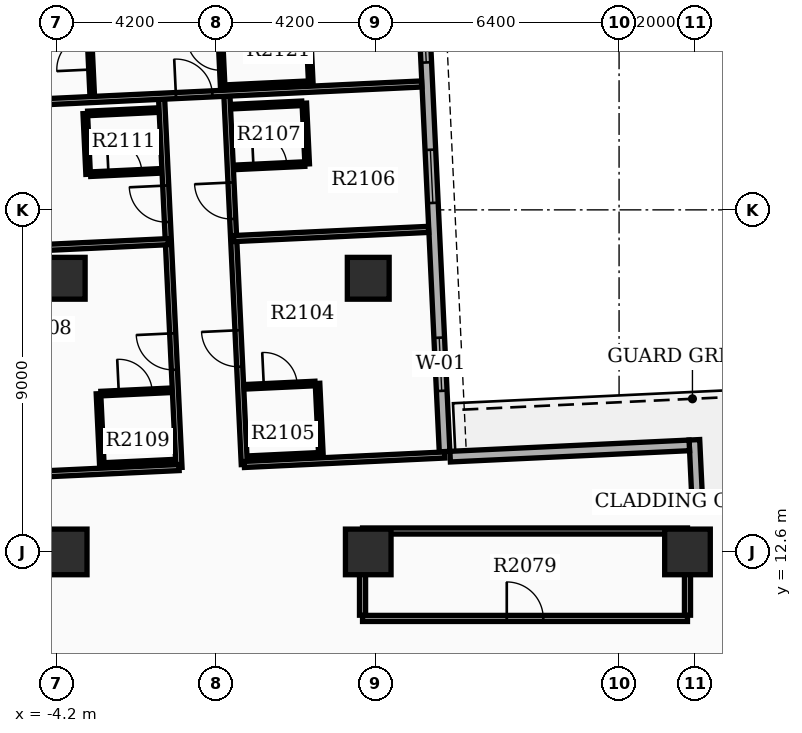
"""IFC4 building model, lengths in metres.
Left out: names, types, materials, properties, quantities, classifications, styles, units other than length and angle.
Written with IfcOpenShell. Run it as: python <this file> out.ifc"""

import sys

from ifc_helpers import new_model, si_unit, direction, frame, frame_2d, origin, origin_2d, place, context, subcontext, project, spatial, rectangle, extrude, element, fill, save


model = new_model("IFC4")
c1 = context("Model", 3, precision=1e-05, world=origin(), true_north=direction((0.0, 1.0)))
c2 = subcontext(c1, "Body", "Model", "MODEL_VIEW")
j1 = project(units=[si_unit("LENGTHUNIT", "METRE"), si_unit("PLANEANGLEUNIT", "RADIAN")], contexts=[c1])
p1 = place(None, origin())
s1 = spatial("IfcSite", under=j1, at=p1, CompositionType="ELEMENT")
p2 = place(p1, origin())
s2 = spatial("IfcBuilding", under=s1, at=p2, CompositionType="ELEMENT")
p3 = place(p2, frame((0.0, 0.0, 132.0)))
s3 = spatial("IfcBuildingStorey", under=s2, at=p3, CompositionType="ELEMENT", Elevation=132.0)
for number, where, z_axis, x_axis in (
    (1, (12.4, 12.6, 0.0), (0.0, 0.0, 1.0), (1.0, 0.0, 0.0)),
    (2, (4.0, 12.6, 0.0), (0.0, 0.0, 1.0), (1.0, 0.0, 0.0)),
    (3, (-4.0, 12.6, 0.0), (0.0, 0.0, 1.0), (1.0, 0.0, 0.0)),
):
    element("IfcColumn", number, at=place(p3, frame(where, z_axis=z_axis, x_axis=x_axis)), inside=s3, PredefinedType="COLUMN", context=c2, shape_type="SweptSolid", body=[
        extrude(rectangle(XDim=1.2, YDim=1.2, at=origin_2d()), origin(), (0.0, 0.0, 1.0), 3.9),
    ])
for number, where, z_axis, x_axis in (
    (4, (-4.0, 19.8, 0.0), (0.0, 0.0, 1.0), (1.0, 0.0, 0.0)),
    (5, (4.0, 19.8, 0.0), (0.0, 0.0, 1.0), (1.0, 0.0, 0.0)),
):
    element("IfcColumn", number, at=place(p3, frame(where, z_axis=z_axis, x_axis=x_axis)), inside=s3, PredefinedType="COLUMN", context=c2, shape_type="SweptSolid", body=[
        extrude(rectangle(XDim=1.1, YDim=1.1, at=origin_2d()), origin(), (0.0, 0.0, 1.0), 3.9),
    ])
p4 = place(p3, frame((6.009, 15.24, 0.0), z_axis=(0.0, 0.0, 1.0), x_axis=(-0.047103473814, 0.998890015344, 0.0)))
e6 = element("IfcWall", 6, at=p4, inside=s3, PredefinedType="STANDARD", context=c2, shape_type="SweptSolid", body=[
    extrude(rectangle(XDim=20.1, YDim=0.28, at=frame_2d((10.05, 0.0))), origin(), (0.0, 0.0, 1.0), 2.97),
])
p5 = place(p4, frame((1.6, 0.0, 0.8)))
e7 = element("IfcOpeningElement", 7, at=p5, cuts=e6, PredefinedType="OPENING", context=c2, shape_type="SweptSolid", body=[
    extrude(rectangle(XDim=1.4, YDim=1.6, at=frame_2d((0.7, 0.8))), frame((0.0, 0.15, 0.0), z_axis=(0.0, -1.0, 0.0), x_axis=(1.0, 0.0, 0.0)), (0.0, 0.0, 1.0), 0.3),
])
p6 = place(p4, frame((6.55, 0.0, 0.8)))
e8 = element("IfcOpeningElement", 8, at=p6, cuts=e6, PredefinedType="OPENING", context=c2, shape_type="SweptSolid", body=[
    extrude(rectangle(XDim=1.4, YDim=1.6, at=frame_2d((0.7, 0.8))), frame((0.0, 0.15, 0.0), z_axis=(0.0, -1.0, 0.0), x_axis=(1.0, 0.0, 0.0)), (0.0, 0.0, 1.0), 0.3),
])
p7 = place(p4, frame((10.25, 0.0, 0.8)))
e9 = element("IfcOpeningElement", 9, at=p7, cuts=e6, PredefinedType="OPENING", context=c2, shape_type="SweptSolid", body=[
    extrude(rectangle(XDim=1.4, YDim=1.6, at=frame_2d((0.7, 0.8))), frame((0.0, 0.15, 0.0), z_axis=(0.0, -1.0, 0.0), x_axis=(1.0, 0.0, 0.0)), (0.0, 0.0, 1.0), 0.3),
])
p8 = place(p4, frame((13.45, 0.0, 0.8)))
e10 = element("IfcOpeningElement", 10, at=p8, cuts=e6, PredefinedType="OPENING", context=c2, shape_type="SweptSolid", body=[
    extrude(rectangle(XDim=1.4, YDim=1.6, at=frame_2d((0.7, 0.8))), frame((0.0, 0.15, 0.0), z_axis=(0.0, -1.0, 0.0), x_axis=(1.0, 0.0, 0.0)), (0.0, 0.0, 1.0), 0.3),
])
p9 = place(p3, frame((14.017, 13.976, 0.0), z_axis=(0.0, 0.0, 1.0), x_axis=(-0.998883930236, -0.047232339719, 0.0)))
e11 = element("IfcWall", 11, at=p9, inside=s3, PredefinedType="STANDARD", context=c2, shape_type="SweptSolid", body=[
    extrude(rectangle(XDim=1.22, YDim=0.28, at=frame_2d((0.61, 0.0))), origin(), (0.0, 0.0, 1.0), 2.97),
])
p10 = place(p3, frame((12.652, 14.052, 0.0), z_axis=(0.0, 0.0, 1.0), x_axis=(-0.047039284441, 0.99889304018, 0.0)))
e12 = element("IfcWall", 12, at=p10, inside=s3, PredefinedType="STANDARD", context=c2, shape_type="SweptSolid", body=[
    extrude(rectangle(XDim=1.5, YDim=0.28, at=frame_2d((0.75, 0.0))), origin(), (0.0, 0.0, 1.0), 2.97),
])
p11 = place(p3, frame((12.448, 15.404, 0.0), z_axis=(0.0, 0.0, 1.0), x_axis=(-0.998889082162, -0.047123258997, 0.0)))
e13 = element("IfcWall", 13, at=p11, inside=s3, PredefinedType="STANDARD", context=c2, shape_type="SweptSolid", body=[
    extrude(rectangle(XDim=6.3, YDim=0.28, at=frame_2d((3.15, 0.0))), origin(), (0.0, 0.0, 1.0), 2.97),
])
p12 = place(p3, frame((3.85, 10.85, 0.0), z_axis=(0.0, 0.0, 1.0), x_axis=(1.0, 0.0, 0.0)))
e14 = element("IfcWall", 14, at=p12, inside=s3, PredefinedType="PARTITIONING", context=c2, shape_type="SweptSolid", body=[
    extrude(rectangle(XDim=8.55, YDim=0.16, at=frame_2d((4.275, 0.0))), origin(), (0.0, 0.0, 1.0), 2.96),
])
p13 = place(p12, frame((3.795, 0.0, 0.0)))
e15 = element("IfcOpeningElement", 15, at=p13, cuts=e14, PredefinedType="OPENING", context=c2, shape_type="SweptSolid", body=[
    extrude(rectangle(XDim=0.96, YDim=2.15, at=frame_2d((0.48, 1.075))), frame((0.0, 0.09, 0.0), z_axis=(0.0, -1.0, 0.0), x_axis=(1.0, 0.0, 0.0)), (0.0, 0.0, 1.0), 0.18),
])
p14 = place(p3, frame((3.85, 13.15, 0.0), z_axis=(0.0, 0.0, 1.0), x_axis=(1.0, 0.0, 0.0)))
e16 = element("IfcWall", 16, at=p14, inside=s3, PredefinedType="PARTITIONING", context=c2, shape_type="SweptSolid", body=[
    extrude(rectangle(XDim=8.55, YDim=0.16, at=frame_2d((4.275, 0.0))), origin(), (0.0, 0.0, 1.0), 2.96),
])
for number, where, z_axis, x_axis in (
    (17, (3.85, 10.935, 0.0), (0.0, 0.0, 1.0), (0.0, 1.0, 0.0)),
    (18, (12.4, 10.935, 0.0), (0.0, 0.0, 1.0), (0.0, 1.0, 0.0)),
):
    element("IfcWall", number, at=place(p3, frame(where, z_axis=z_axis, x_axis=x_axis)), inside=s3, PredefinedType="PARTITIONING", context=c2, shape_type="SweptSolid", body=[
        extrude(rectangle(XDim=2.13, YDim=0.16, at=frame_2d((1.065, 0.0))), origin(), (0.0, 0.0, 1.0), 2.96),
    ])
p15 = place(p3, frame((0.739, 14.901, 0.0), z_axis=(0.0, 0.0, 1.0), x_axis=(-0.047116711769, 0.99888939101, 0.0)))
e19 = element("IfcWall", 19, at=p15, inside=s3, PredefinedType="PARTITIONING", context=c2, shape_type="SweptSolid", body=[
    extrude(rectangle(XDim=9.7, YDim=0.16, at=frame_2d((4.85, 0.0))), origin(), (0.0, 0.0, 1.0), 2.96),
])
p16 = place(p15, frame((2.575, 0.0, 0.0)))
e20 = element("IfcOpeningElement", 20, at=p16, cuts=e19, PredefinedType="OPENING", context=c2, shape_type="SweptSolid", body=[
    extrude(rectangle(XDim=0.96, YDim=2.15, at=frame_2d((0.48, 1.075))), frame((0.0, 0.09, 0.0), z_axis=(0.0, -1.0, 0.0), x_axis=(1.0, 0.0, 0.0)), (0.0, 0.0, 1.0), 0.18),
])
p17 = place(p15, frame((6.467, 0.0, 0.0)))
e21 = element("IfcOpeningElement", 21, at=p17, cuts=e19, PredefinedType="OPENING", context=c2, shape_type="SweptSolid", body=[
    extrude(rectangle(XDim=0.96, YDim=2.15, at=frame_2d((0.48, 1.075))), frame((0.0, 0.09, 0.0), z_axis=(0.0, -1.0, 0.0), x_axis=(1.0, 0.0, 0.0)), (0.0, 0.0, 1.0), 0.18),
])
p18 = place(p3, frame((0.739, 14.901, 0.0), z_axis=(0.0, 0.0, 1.0), x_axis=(0.998889275357, 0.047119163577, 0.0)))
e22 = element("IfcWall", 22, at=p18, inside=s3, PredefinedType="PARTITIONING", context=c2, shape_type="SweptSolid", body=[
    extrude(rectangle(XDim=5.28, YDim=0.16, at=frame_2d((2.64, 0.0))), origin(), (0.0, 0.0, 1.0), 2.96),
])
p19 = place(p3, frame((0.458, 20.845, 0.0), z_axis=(0.0, 0.0, 1.0), x_axis=(0.998890413328, 0.047095033298, 0.0)))
e23 = element("IfcWall", 23, at=p19, inside=s3, PredefinedType="PARTITIONING", context=c2, shape_type="SweptSolid", body=[
    extrude(rectangle(XDim=5.132, YDim=0.16, at=frame_2d((2.566, 0.0))), origin(), (0.0, 0.0, 1.0), 2.96),
])
p20 = place(p3, frame((0.783, 16.946, 0.0), z_axis=(0.0, 0.0, 1.0), x_axis=(0.998890786574, 0.047087116047, 0.0)))
e24 = element("IfcWall", 24, at=p20, inside=s3, PredefinedType="PARTITIONING", context=c2, shape_type="SweptSolid", body=[
    extrude(rectangle(XDim=1.82, YDim=0.12, at=frame_2d((0.91, 0.0))), origin(), (0.0, 0.0, 1.0), 2.96),
])
p21 = place(p20, frame((0.47, 0.0, 0.0)))
e25 = element("IfcOpeningElement", 25, at=p21, cuts=e24, PredefinedType="OPENING", context=c2, shape_type="SweptSolid", body=[
    extrude(rectangle(XDim=0.88, YDim=2.1, at=frame_2d((0.44, 1.05))), frame((0.0, 0.07, 0.0), z_axis=(0.0, -1.0, 0.0), x_axis=(1.0, 0.0, 0.0)), (0.0, 0.0, 1.0), 0.14),
])
p22 = place(p3, frame((0.871, 15.068, 0.0), z_axis=(0.0, 0.0, 1.0), x_axis=(0.998891083954, 0.047080807099, 0.0)))
e26 = element("IfcWall", 26, at=p22, inside=s3, PredefinedType="PARTITIONING", context=c2, shape_type="SweptSolid", body=[
    extrude(rectangle(XDim=1.82, YDim=0.12, at=frame_2d((0.91, 0.0))), origin(), (0.0, 0.0, 1.0), 2.96),
])
p23 = place(p3, frame((2.754, 15.156, 0.0), z_axis=(0.0, 0.0, 1.0), x_axis=(-0.047139425368, 0.998888319371, 0.0)))
e27 = element("IfcWall", 27, at=p23, inside=s3, PredefinedType="PARTITIONING", context=c2, shape_type="SweptSolid", body=[
    extrude(rectangle(XDim=1.88, YDim=0.12, at=frame_2d((0.94, 0.0))), origin(), (0.0, 0.0, 1.0), 2.96),
])
p24 = place(p3, frame((0.51, 22.719, 0.0), z_axis=(0.0, 0.0, 1.0), x_axis=(0.998891083954, 0.047080807099, 0.0)))
e28 = element("IfcWall", 28, at=p24, inside=s3, PredefinedType="PARTITIONING", context=c2, shape_type="SweptSolid", body=[
    extrude(rectangle(XDim=1.82, YDim=0.12, at=frame_2d((0.91, 0.0))), origin(), (0.0, 0.0, 1.0), 2.96),
])
p25 = place(p24, frame((0.47, 0.0, 0.0)))
e29 = element("IfcOpeningElement", 29, at=p25, cuts=e28, PredefinedType="OPENING", context=c2, shape_type="SweptSolid", body=[
    extrude(rectangle(XDim=0.88, YDim=2.1, at=frame_2d((0.44, 1.05))), frame((0.0, 0.07, 0.0), z_axis=(0.0, -1.0, 0.0), x_axis=(1.0, 0.0, 0.0)), (0.0, 0.0, 1.0), 0.14),
])
p26 = place(p3, frame((0.435, 24.317, 0.0), z_axis=(0.0, 0.0, 1.0), x_axis=(0.998884467853, 0.047220968666, 0.0)))
e30 = element("IfcWall", 30, at=p26, inside=s3, PredefinedType="PARTITIONING", context=c2, shape_type="SweptSolid", body=[
    extrude(rectangle(XDim=1.82, YDim=0.12, at=frame_2d((0.91, 0.0))), origin(), (0.0, 0.0, 1.0), 2.96),
])
p27 = place(p3, frame((2.393, 22.808, 0.0), z_axis=(0.0, 0.0, 1.0), x_axis=(-0.047151895633, 0.998887730798, 0.0)))
e31 = element("IfcWall", 31, at=p27, inside=s3, PredefinedType="PARTITIONING", context=c2, shape_type="SweptSolid", body=[
    extrude(rectangle(XDim=1.6, YDim=0.12, at=frame_2d((0.8, 0.0))), origin(), (0.0, 0.0, 1.0), 2.96),
])
p28 = place(p3, frame((-0.979, 14.82, 0.0), z_axis=(0.0, 0.0, 1.0), x_axis=(-0.047116711769, 0.99888939101, 0.0)))
e32 = element("IfcWall", 32, at=p28, inside=s3, PredefinedType="PARTITIONING", context=c2, shape_type="SweptSolid", body=[
    extrude(rectangle(XDim=9.7, YDim=0.16, at=frame_2d((4.85, 0.0))), origin(), (0.0, 0.0, 1.0), 2.96),
])
p29 = place(p28, frame((2.575, 0.0, 0.0)))
e33 = element("IfcOpeningElement", 33, at=p29, cuts=e32, PredefinedType="OPENING", context=c2, shape_type="SweptSolid", body=[
    extrude(rectangle(XDim=0.96, YDim=2.15, at=frame_2d((0.48, 1.075))), frame((0.0, 0.09, 0.0), z_axis=(0.0, -1.0, 0.0), x_axis=(1.0, 0.0, 0.0)), (0.0, 0.0, 1.0), 0.18),
])
p30 = place(p28, frame((6.467, 0.0, 0.0)))
e34 = element("IfcOpeningElement", 34, at=p30, cuts=e32, PredefinedType="OPENING", context=c2, shape_type="SweptSolid", body=[
    extrude(rectangle(XDim=0.96, YDim=2.15, at=frame_2d((0.48, 1.075))), frame((0.0, 0.09, 0.0), z_axis=(0.0, -1.0, 0.0), x_axis=(1.0, 0.0, 0.0)), (0.0, 0.0, 1.0), 0.18),
])
p31 = place(p3, frame((-0.979, 14.82, 0.0), z_axis=(0.0, 0.0, 1.0), x_axis=(-0.998890922349, -0.047084235666, 0.0)))
e35 = element("IfcWall", 35, at=p31, inside=s3, PredefinedType="PARTITIONING", context=c2, shape_type="SweptSolid", body=[
    extrude(rectangle(XDim=6.44, YDim=0.16, at=frame_2d((3.22, 0.0))), origin(), (0.0, 0.0, 1.0), 2.96),
])
p32 = place(p3, frame((-1.26, 20.764, 0.0), z_axis=(0.0, 0.0, 1.0), x_axis=(-0.998889891508, -0.047106099844, 0.0)))
e36 = element("IfcWall", 36, at=p32, inside=s3, PredefinedType="PARTITIONING", context=c2, shape_type="SweptSolid", body=[
    extrude(rectangle(XDim=6.292, YDim=0.16, at=frame_2d((3.146, 0.0))), origin(), (0.0, 0.0, 1.0), 2.96),
])
p33 = place(p3, frame((-3.033, 16.766, 0.0), z_axis=(0.0, 0.0, 1.0), x_axis=(0.998884766924, 0.047214641863, 0.0)))
e37 = element("IfcWall", 37, at=p33, inside=s3, PredefinedType="PARTITIONING", context=c2, shape_type="SweptSolid", body=[
    extrude(rectangle(XDim=1.82, YDim=0.12, at=frame_2d((0.91, 0.0))), origin(), (0.0, 0.0, 1.0), 2.96),
])
p34 = place(p33, frame((0.47, 0.0, 0.0)))
e38 = element("IfcOpeningElement", 38, at=p34, cuts=e37, PredefinedType="OPENING", context=c2, shape_type="SweptSolid", body=[
    extrude(rectangle(XDim=0.88, YDim=2.1, at=frame_2d((0.44, 1.05))), frame((0.0, 0.07, 0.0), z_axis=(0.0, -1.0, 0.0), x_axis=(1.0, 0.0, 0.0)), (0.0, 0.0, 1.0), 0.14),
])
p35 = place(p3, frame((-2.945, 14.888, 0.0), z_axis=(0.0, 0.0, 1.0), x_axis=(0.998884467853, 0.047220968666, 0.0)))
e39 = element("IfcWall", 39, at=p35, inside=s3, PredefinedType="PARTITIONING", context=c2, shape_type="SweptSolid", body=[
    extrude(rectangle(XDim=1.82, YDim=0.12, at=frame_2d((0.91, 0.0))), origin(), (0.0, 0.0, 1.0), 2.96),
])
p36 = place(p3, frame((-3.01, 14.885, 0.0), z_axis=(0.0, 0.0, 1.0), x_axis=(-0.047139425368, 0.998888319371, 0.0)))
e40 = element("IfcWall", 40, at=p36, inside=s3, PredefinedType="PARTITIONING", context=c2, shape_type="SweptSolid", body=[
    extrude(rectangle(XDim=1.88, YDim=0.12, at=frame_2d((0.94, 0.0))), origin(), (0.0, 0.0, 1.0), 2.96),
])
p37 = place(p3, frame((-3.305, 22.539, 0.0), z_axis=(0.0, 0.0, 1.0), x_axis=(0.998891083954, 0.047080807099, 0.0)))
e41 = element("IfcWall", 41, at=p37, inside=s3, PredefinedType="PARTITIONING", context=c2, shape_type="SweptSolid", body=[
    extrude(rectangle(XDim=1.82, YDim=0.12, at=frame_2d((0.91, 0.0))), origin(), (0.0, 0.0, 1.0), 2.96),
])
p38 = place(p37, frame((0.47, 0.0, 0.0)))
e42 = element("IfcOpeningElement", 42, at=p38, cuts=e41, PredefinedType="OPENING", context=c2, shape_type="SweptSolid", body=[
    extrude(rectangle(XDim=0.88, YDim=2.1, at=frame_2d((0.44, 1.05))), frame((0.0, 0.07, 0.0), z_axis=(0.0, -1.0, 0.0), x_axis=(1.0, 0.0, 0.0)), (0.0, 0.0, 1.0), 0.14),
])
p39 = place(p3, frame((-3.381, 24.137, 0.0), z_axis=(0.0, 0.0, 1.0), x_axis=(0.998884766924, 0.047214641863, 0.0)))
e43 = element("IfcWall", 43, at=p39, inside=s3, PredefinedType="PARTITIONING", context=c2, shape_type="SweptSolid", body=[
    extrude(rectangle(XDim=1.82, YDim=0.12, at=frame_2d((0.91, 0.0))), origin(), (0.0, 0.0, 1.0), 2.96),
])
p40 = place(p3, frame((-3.37, 22.536, 0.0), z_axis=(0.0, 0.0, 1.0), x_axis=(-0.047151895633, 0.998887730798, 0.0)))
e44 = element("IfcWall", 44, at=p40, inside=s3, PredefinedType="PARTITIONING", context=c2, shape_type="SweptSolid", body=[
    extrude(rectangle(XDim=1.6, YDim=0.12, at=frame_2d((0.8, 0.0))), origin(), (0.0, 0.0, 1.0), 2.96),
])
p41 = place(p3, frame((-7.725, 24.293, 0.0), z_axis=(0.0, 0.0, 1.0), x_axis=(0.998889967692, 0.047104484326, 0.0)))
e45 = element("IfcWall", 45, at=p41, inside=s3, PredefinedType="PARTITIONING", context=c2, shape_type="SweptSolid", body=[
    extrude(rectangle(XDim=13.144, YDim=0.16, at=frame_2d((6.572, 0.0))), origin(), (0.0, 0.0, 1.0), 2.96),
])
p42 = place(p41, frame((6.672, 0.0, 0.0)))
e46 = element("IfcOpeningElement", 46, at=p42, cuts=e45, PredefinedType="OPENING", context=c2, shape_type="SweptSolid", body=[
    extrude(rectangle(XDim=0.96, YDim=2.15, at=frame_2d((0.48, 1.075))), frame((0.0, 0.09, 0.0), z_axis=(0.0, -1.0, 0.0), x_axis=(1.0, 0.0, 0.0)), (0.0, 0.0, 1.0), 0.18),
])
p43 = place(p3, frame((-3.262, 24.594, 0.0), z_axis=(0.0, 0.0, 1.0), x_axis=(-0.047089343138, 0.998890681588, 0.0)))
e47 = element("IfcWall", 47, at=p43, inside=s3, PredefinedType="PARTITIONING", context=c2, shape_type="SweptSolid", body=[
    extrude(rectangle(XDim=10.312, YDim=0.12, at=frame_2d((5.156, 0.0))), origin(), (0.0, 0.0, 1.0), 2.96),
])
p44 = place(p43, frame((0.7, 0.0, 0.0)))
e48 = element("IfcOpeningElement", 48, at=p44, cuts=e47, PredefinedType="OPENING", context=c2, shape_type="SweptSolid", body=[
    extrude(rectangle(XDim=0.9, YDim=2.1, at=frame_2d((0.45, 1.05))), frame((0.0, 0.07, 0.0), z_axis=(0.0, -1.0, 0.0), x_axis=(1.0, 0.0, 0.0)), (0.0, 0.0, 1.0), 0.14),
])
p45 = place(p3, frame((0.171, 24.826, 0.0), z_axis=(0.0, 0.0, 1.0), x_axis=(-0.047087116047, 0.998890786574, 0.0)))
e49 = element("IfcWall", 49, at=p45, inside=s3, PredefinedType="PARTITIONING", context=c2, shape_type="SweptSolid", body=[
    extrude(rectangle(XDim=1.82, YDim=0.12, at=frame_2d((0.91, 0.0))), origin(), (0.0, 0.0, 1.0), 2.96),
])
p46 = place(p45, frame((0.45, 0.0, 0.0)))
e50 = element("IfcOpeningElement", 50, at=p46, cuts=e49, PredefinedType="OPENING", context=c2, shape_type="SweptSolid", body=[
    extrude(rectangle(XDim=0.88, YDim=2.1, at=frame_2d((0.44, 1.05))), frame((0.0, 0.07, 0.0), z_axis=(0.0, -1.0, 0.0), x_axis=(1.0, 0.0, 0.0)), (0.0, 0.0, 1.0), 0.14),
])
p47 = place(p3, frame((2.488, 24.935, 0.0), z_axis=(0.0, 0.0, 1.0), x_axis=(-0.047214641863, 0.998884766924, 0.0)))
e51 = element("IfcWall", 51, at=p47, inside=s3, PredefinedType="PARTITIONING", context=c2, shape_type="SweptSolid", body=[
    extrude(rectangle(XDim=1.82, YDim=0.12, at=frame_2d((0.91, 0.0))), origin(), (0.0, 0.0, 1.0), 2.96),
])
p48 = place(p3, frame((0.241, 24.829, 0.0), z_axis=(0.0, 0.0, 1.0), x_axis=(0.998887815408, 0.047150103183, 0.0)))
e52 = element("IfcWall", 52, at=p48, inside=s3, PredefinedType="PARTITIONING", context=c2, shape_type="SweptSolid", body=[
    extrude(rectangle(XDim=2.18, YDim=0.12, at=frame_2d((1.09, 0.0))), origin(), (0.0, 0.0, 1.0), 2.96),
])
p49 = place(p5, origin())
e53 = element("IfcWindow", 53, at=p49, inside=s3, PartitioningType="SINGLE_PANEL", PredefinedType="WINDOW", context=c2, shape_type="SweptSolid", body=[
    extrude(rectangle(XDim=1.4, YDim=1.6, at=frame_2d((0.7, 0.8))), frame((0.0, 0.03, 0.0), z_axis=(0.0, -1.0, 0.0), x_axis=(1.0, 0.0, 0.0)), (0.0, 0.0, 1.0), 0.06),
])
fill(e7, e53)
p50 = place(p6, origin())
e54 = element("IfcWindow", 54, at=p50, inside=s3, PartitioningType="SINGLE_PANEL", PredefinedType="WINDOW", context=c2, shape_type="SweptSolid", body=[
    extrude(rectangle(XDim=1.4, YDim=1.6, at=frame_2d((0.7, 0.8))), frame((0.0, 0.03, 0.0), z_axis=(0.0, -1.0, 0.0), x_axis=(1.0, 0.0, 0.0)), (0.0, 0.0, 1.0), 0.06),
])
fill(e8, e54)
p51 = place(p7, origin())
e55 = element("IfcWindow", 55, at=p51, inside=s3, PartitioningType="SINGLE_PANEL", PredefinedType="WINDOW", context=c2, shape_type="SweptSolid", body=[
    extrude(rectangle(XDim=1.4, YDim=1.6, at=frame_2d((0.7, 0.8))), frame((0.0, 0.03, 0.0), z_axis=(0.0, -1.0, 0.0), x_axis=(1.0, 0.0, 0.0)), (0.0, 0.0, 1.0), 0.06),
])
fill(e9, e55)
p52 = place(p13, origin())
e56 = element("IfcDoor", 56, at=p52, inside=s3, OperationType="SINGLE_SWING_LEFT", PredefinedType="DOOR", context=c2, shape_type="SweptSolid", body=[
    extrude(rectangle(XDim=0.96, YDim=2.15, at=frame_2d((0.48, 1.075))), frame((0.0, 0.025, 0.0), z_axis=(0.0, -1.0, 0.0), x_axis=(1.0, 0.0, 0.0)), (0.0, 0.0, 1.0), 0.05),
])
fill(e15, e56)
p53 = place(p16, origin())
e57 = element("IfcDoor", 57, at=p53, inside=s3, OperationType="SINGLE_SWING_RIGHT", PredefinedType="DOOR", context=c2, shape_type="SweptSolid", body=[
    extrude(rectangle(XDim=0.96, YDim=2.15, at=frame_2d((0.48, 1.075))), frame((0.0, 0.025, 0.0), z_axis=(0.0, -1.0, 0.0), x_axis=(1.0, 0.0, 0.0)), (0.0, 0.0, 1.0), 0.05),
])
fill(e20, e57)
p54 = place(p21, origin())
e58 = element("IfcDoor", 58, at=p54, inside=s3, OperationType="SINGLE_SWING_LEFT", PredefinedType="DOOR", context=c2, shape_type="SweptSolid", body=[
    extrude(rectangle(XDim=0.88, YDim=2.1, at=frame_2d((0.44, 1.05))), frame((0.0, 0.025, 0.0), z_axis=(0.0, -1.0, 0.0), x_axis=(1.0, 0.0, 0.0)), (0.0, 0.0, 1.0), 0.05),
])
fill(e25, e58)
p55 = place(p17, origin())
e59 = element("IfcDoor", 59, at=p55, inside=s3, OperationType="SINGLE_SWING_RIGHT", PredefinedType="DOOR", context=c2, shape_type="SweptSolid", body=[
    extrude(rectangle(XDim=0.96, YDim=2.15, at=frame_2d((0.48, 1.075))), frame((0.0, 0.025, 0.0), z_axis=(0.0, -1.0, 0.0), x_axis=(1.0, 0.0, 0.0)), (0.0, 0.0, 1.0), 0.05),
])
fill(e21, e59)
p56 = place(p25, origin())
e60 = element("IfcDoor", 60, at=p56, inside=s3, OperationType="SINGLE_SWING_LEFT", PredefinedType="DOOR", context=c2, shape_type="SweptSolid", body=[
    extrude(rectangle(XDim=0.88, YDim=2.1, at=frame_2d((0.44, 1.05))), frame((0.0, 0.025, 0.0), z_axis=(0.0, -1.0, 0.0), x_axis=(1.0, 0.0, 0.0)), (0.0, 0.0, 1.0), 0.05),
])
fill(e29, e60)
p57 = place(p29, origin())
e61 = element("IfcDoor", 61, at=p57, inside=s3, OperationType="SINGLE_SWING_RIGHT", PredefinedType="DOOR", context=c2, shape_type="SweptSolid", body=[
    extrude(rectangle(XDim=0.96, YDim=2.15, at=frame_2d((0.48, 1.075))), frame((0.0, 0.025, 0.0), z_axis=(0.0, -1.0, 0.0), x_axis=(1.0, 0.0, 0.0)), (0.0, 0.0, 1.0), 0.05),
])
fill(e33, e61)
p58 = place(p34, origin())
e62 = element("IfcDoor", 62, at=p58, inside=s3, OperationType="SINGLE_SWING_LEFT", PredefinedType="DOOR", context=c2, shape_type="SweptSolid", body=[
    extrude(rectangle(XDim=0.88, YDim=2.1, at=frame_2d((0.44, 1.05))), frame((0.0, 0.025, 0.0), z_axis=(0.0, -1.0, 0.0), x_axis=(1.0, 0.0, 0.0)), (0.0, 0.0, 1.0), 0.05),
])
fill(e38, e62)
p59 = place(p30, origin())
e63 = element("IfcDoor", 63, at=p59, inside=s3, OperationType="SINGLE_SWING_RIGHT", PredefinedType="DOOR", context=c2, shape_type="SweptSolid", body=[
    extrude(rectangle(XDim=0.96, YDim=2.15, at=frame_2d((0.48, 1.075))), frame((0.0, 0.025, 0.0), z_axis=(0.0, -1.0, 0.0), x_axis=(1.0, 0.0, 0.0)), (0.0, 0.0, 1.0), 0.05),
])
fill(e34, e63)
p60 = place(p38, origin())
e64 = element("IfcDoor", 64, at=p60, inside=s3, OperationType="SINGLE_SWING_LEFT", PredefinedType="DOOR", context=c2, shape_type="SweptSolid", body=[
    extrude(rectangle(XDim=0.88, YDim=2.1, at=frame_2d((0.44, 1.05))), frame((0.0, 0.025, 0.0), z_axis=(0.0, -1.0, 0.0), x_axis=(1.0, 0.0, 0.0)), (0.0, 0.0, 1.0), 0.05),
])
fill(e42, e64)
p61 = place(p42, origin())
e65 = element("IfcDoor", 65, at=p61, inside=s3, OperationType="SINGLE_SWING_LEFT", PredefinedType="DOOR", context=c2, shape_type="SweptSolid", body=[
    extrude(rectangle(XDim=0.96, YDim=2.15, at=frame_2d((0.48, 1.075))), frame((0.0, 0.025, 0.0), z_axis=(0.0, -1.0, 0.0), x_axis=(1.0, 0.0, 0.0)), (0.0, 0.0, 1.0), 0.05),
])
fill(e46, e65)
p62 = place(p44, origin())
e66 = element("IfcDoor", 66, at=p62, inside=s3, OperationType="SINGLE_SWING_LEFT", PredefinedType="DOOR", context=c2, shape_type="SweptSolid", body=[
    extrude(rectangle(XDim=0.9, YDim=2.1, at=frame_2d((0.45, 1.05))), frame((0.0, 0.025, 0.0), z_axis=(0.0, -1.0, 0.0), x_axis=(1.0, 0.0, 0.0)), (0.0, 0.0, 1.0), 0.05),
])
fill(e48, e66)
p63 = place(p46, origin())
e67 = element("IfcDoor", 67, at=p63, inside=s3, OperationType="SINGLE_SWING_RIGHT", PredefinedType="DOOR", context=c2, shape_type="SweptSolid", body=[
    extrude(rectangle(XDim=0.88, YDim=2.1, at=frame_2d((0.44, 1.05))), frame((0.0, 0.025, 0.0), z_axis=(0.0, -1.0, 0.0), x_axis=(1.0, 0.0, 0.0)), (0.0, 0.0, 1.0), 0.05),
])
fill(e50, e67)
save(model, sys.argv[1])
